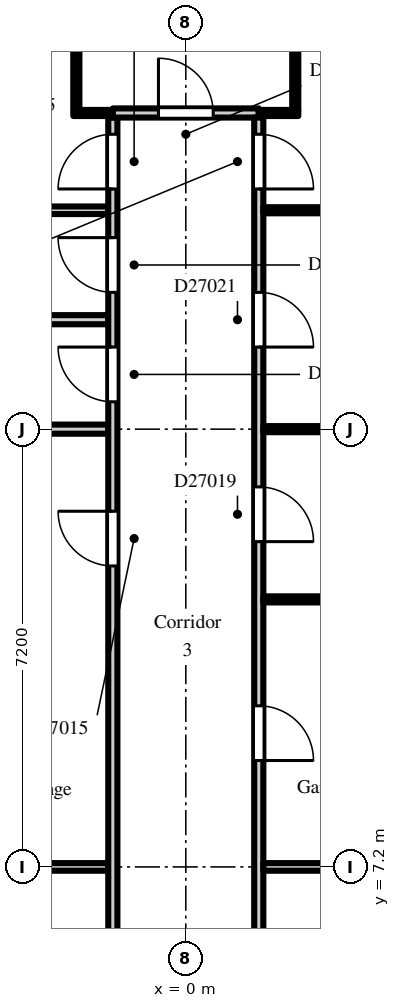
"""IFC4 building model, lengths in metres.
Left out: names, types, materials, properties, quantities, classifications, styles, units other than length and angle.
Written with IfcOpenShell. Run it as: python <this file> out.ifc"""

import sys

from ifc_helpers import new_model, si_unit, direction, frame, frame_2d, origin, place, context, subcontext, project, spatial, rectangle, extrude, element, fill, save


model = new_model("IFC4")
c1 = context("Model", 3, precision=1e-05, world=origin(), true_north=direction((0.0, 1.0)))
c2 = subcontext(c1, "Body", "Model", "MODEL_VIEW")
j1 = project(units=[si_unit("LENGTHUNIT", "METRE"), si_unit("PLANEANGLEUNIT", "RADIAN")], contexts=[c1])
p1 = place(None, origin())
s1 = spatial("IfcSite", under=j1, at=p1, CompositionType="ELEMENT")
p2 = place(p1, origin())
s2 = spatial("IfcBuilding", under=s1, at=p2, CompositionType="ELEMENT")
p3 = place(p2, frame((0.0, 0.0, 188.7)))
s3 = spatial("IfcBuildingStorey", under=s2, at=p3, CompositionType="ELEMENT", Elevation=188.7)
p4 = place(p3, frame((-6.9, 16.2, 0.0), z_axis=(0.0, 0.0, 1.0), x_axis=(1.0, 0.0, 0.0)))
e1 = element("IfcWall", 1, at=p4, inside=s3, PredefinedType="PARTITIONING", context=c2, shape_type="SweptSolid", body=[
    extrude(rectangle(XDim=5.625, YDim=0.15, at=frame_2d((2.812, 0.0))), origin(), (0.0, 0.0, 1.0), 2.6),
])
p5 = place(p3, frame((-5.1, 18.0, 0.0), z_axis=(0.0, 0.0, 1.0), x_axis=(1.0, 0.0, 0.0)))
e2 = element("IfcWall", 2, at=p5, inside=s3, PredefinedType="PARTITIONING", context=c2, shape_type="SweptSolid", body=[
    extrude(rectangle(XDim=3.825, YDim=0.125, at=frame_2d((1.913, 0.0))), origin(), (0.0, 0.0, 1.0), 2.6),
])
p6 = place(p3, frame((-3.9, 7.2, 0.0), z_axis=(0.0, 0.0, 1.0), x_axis=(1.0, 0.0, 0.0)))
e3 = element("IfcWall", 3, at=p6, inside=s3, PredefinedType="PARTITIONING", context=c2, shape_type="SweptSolid", body=[
    extrude(rectangle(XDim=2.625, YDim=0.125, at=frame_2d((1.312, 0.0))), origin(), (0.0, 0.0, 1.0), 2.6),
])
p7 = place(p3, frame((-3.9, 14.4, 0.0), z_axis=(0.0, 0.0, 1.0), x_axis=(1.0, 0.0, 0.0)))
e4 = element("IfcWall", 4, at=p7, inside=s3, PredefinedType="PARTITIONING", context=c2, shape_type="SweptSolid", body=[
    extrude(rectangle(XDim=2.625, YDim=0.15, at=frame_2d((1.312, 0.0))), origin(), (0.0, 0.0, 1.0), 2.6),
])
p8 = place(p3, frame((-1.8, 19.55, 0.0), z_axis=(0.0, 0.0, 1.0), x_axis=(0.0, 1.0, 0.0)))
e5 = element("IfcWall", 5, at=p8, inside=s3, PredefinedType="PARTITIONING", context=c2, shape_type="SweptSolid", body=[
    extrude(rectangle(XDim=1.75, YDim=0.1, at=frame_2d((0.875, 0.0))), origin(), (0.0, 0.0, 1.0), 2.6),
])
p9 = place(p3, frame((-1.75, 19.6, 0.0), z_axis=(0.0, 0.0, 1.0), x_axis=(1.0, 0.0, 0.0)))
e6 = element("IfcWall", 6, at=p9, inside=s3, PredefinedType="PARTITIONING", context=c2, shape_type="SweptSolid", body=[
    extrude(rectangle(XDim=0.55, YDim=0.1, at=frame_2d((0.275, 0.0))), origin(), (0.0, 0.0, 1.0), 2.6),
])
p10 = place(p3, frame((-1.2, 1.275, 0.0), z_axis=(0.0, 0.0, 1.0), x_axis=(0.0, 1.0, 0.0)))
e7 = element("IfcWall", 7, at=p10, inside=s3, PredefinedType="PARTITIONING", context=c2, shape_type="SweptSolid", body=[
    extrude(rectangle(XDim=18.25, YDim=0.15, at=frame_2d((9.125, 0.0))), origin(), (0.0, 0.0, 1.0), 2.6),
])
p11 = place(p10, frame((2.475, 0.0, 0.0)))
e8 = element("IfcOpeningElement", 8, at=p11, cuts=e7, PredefinedType="OPENING", context=c2, shape_type="SweptSolid", body=[
    extrude(rectangle(XDim=0.9, YDim=2.1, at=frame_2d((0.45, 1.05))), frame((0.0, 0.085, 0.0), z_axis=(0.0, -1.0, 0.0), x_axis=(1.0, 0.0, 0.0)), (0.0, 0.0, 1.0), 0.17),
])
p12 = place(p10, frame((10.875, 0.0, 0.0)))
e9 = element("IfcOpeningElement", 9, at=p12, cuts=e7, PredefinedType="OPENING", context=c2, shape_type="SweptSolid", body=[
    extrude(rectangle(XDim=0.9, YDim=2.1, at=frame_2d((0.45, 1.05))), frame((0.0, 0.085, 0.0), z_axis=(0.0, -1.0, 0.0), x_axis=(1.0, 0.0, 0.0)), (0.0, 0.0, 1.0), 0.17),
])
p13 = place(p10, frame((13.575, 0.0, 0.0)))
e10 = element("IfcOpeningElement", 10, at=p13, cuts=e7, PredefinedType="OPENING", context=c2, shape_type="SweptSolid", body=[
    extrude(rectangle(XDim=0.9, YDim=2.1, at=frame_2d((0.45, 1.05))), frame((0.0, 0.085, 0.0), z_axis=(0.0, -1.0, 0.0), x_axis=(1.0, 0.0, 0.0)), (0.0, 0.0, 1.0), 0.17),
])
p14 = place(p10, frame((15.375, 0.0, 0.0)))
e11 = element("IfcOpeningElement", 11, at=p14, cuts=e7, PredefinedType="OPENING", context=c2, shape_type="SweptSolid", body=[
    extrude(rectangle(XDim=0.9, YDim=2.1, at=frame_2d((0.45, 1.05))), frame((0.0, 0.085, 0.0), z_axis=(0.0, -1.0, 0.0), x_axis=(1.0, 0.0, 0.0)), (0.0, 0.0, 1.0), 0.17),
])
p15 = place(p10, frame((17.075, 0.0, 0.0)))
e12 = element("IfcOpeningElement", 12, at=p15, cuts=e7, PredefinedType="OPENING", context=c2, shape_type="SweptSolid", body=[
    extrude(rectangle(XDim=0.9, YDim=2.1, at=frame_2d((0.45, 1.05))), frame((0.0, 0.085, 0.0), z_axis=(0.0, -1.0, 0.0), x_axis=(1.0, 0.0, 0.0)), (0.0, 0.0, 1.0), 0.17),
])
p16 = place(p3, frame((-1.2, 19.6, 0.0), z_axis=(0.0, 0.0, 1.0), x_axis=(1.0, 0.0, 0.0)))
e13 = element("IfcWall", 13, at=p16, inside=s3, PredefinedType="PARTITIONING", context=c2, shape_type="SweptSolid", body=[
    extrude(rectangle(XDim=2.4, YDim=0.15, at=frame_2d((1.2, 0.0))), origin(), (0.0, 0.0, 1.0), 2.6),
])
p17 = place(p16, frame((0.75, 0.0, 0.0)))
e14 = element("IfcOpeningElement", 14, at=p17, cuts=e13, PredefinedType="OPENING", context=c2, shape_type="SweptSolid", body=[
    extrude(rectangle(XDim=0.9, YDim=2.1, at=frame_2d((0.45, 1.05))), frame((0.0, 0.085, 0.0), z_axis=(0.0, -1.0, 0.0), x_axis=(1.0, 0.0, 0.0)), (0.0, 0.0, 1.0), 0.17),
])
p18 = place(p3, frame((1.2, 1.125, 0.0), z_axis=(0.0, 0.0, 1.0), x_axis=(0.0, 1.0, 0.0)))
e15 = element("IfcWall", 15, at=p18, inside=s3, PredefinedType="PARTITIONING", context=c2, shape_type="SweptSolid", body=[
    extrude(rectangle(XDim=18.4, YDim=0.15, at=frame_2d((9.2, 0.0))), origin(), (0.0, 0.0, 1.0), 2.6),
])
p19 = place(p18, frame((3.825, 0.0, 0.0)))
e16 = element("IfcOpeningElement", 16, at=p19, cuts=e15, PredefinedType="OPENING", context=c2, shape_type="SweptSolid", body=[
    extrude(rectangle(XDim=0.9, YDim=2.1, at=frame_2d((0.45, 1.05))), frame((0.0, 0.085, 0.0), z_axis=(0.0, -1.0, 0.0), x_axis=(1.0, 0.0, 0.0)), (0.0, 0.0, 1.0), 0.17),
])
p20 = place(p18, frame((11.425, 0.0, 0.0)))
e17 = element("IfcOpeningElement", 17, at=p20, cuts=e15, PredefinedType="OPENING", context=c2, shape_type="SweptSolid", body=[
    extrude(rectangle(XDim=0.9, YDim=2.1, at=frame_2d((0.45, 1.05))), frame((0.0, 0.085, 0.0), z_axis=(0.0, -1.0, 0.0), x_axis=(1.0, 0.0, 0.0)), (0.0, 0.0, 1.0), 0.17),
])
p21 = place(p18, frame((7.825, 0.0, 0.0)))
e18 = element("IfcOpeningElement", 18, at=p21, cuts=e15, PredefinedType="OPENING", context=c2, shape_type="SweptSolid", body=[
    extrude(rectangle(XDim=0.9, YDim=2.1, at=frame_2d((0.45, 1.05))), frame((0.0, 0.085, 0.0), z_axis=(0.0, -1.0, 0.0), x_axis=(1.0, 0.0, 0.0)), (0.0, 0.0, 1.0), 0.17),
])
p22 = place(p18, frame((14.625, 0.0, 0.0)))
e19 = element("IfcOpeningElement", 19, at=p22, cuts=e15, PredefinedType="OPENING", context=c2, shape_type="SweptSolid", body=[
    extrude(rectangle(XDim=0.9, YDim=2.1, at=frame_2d((0.45, 1.05))), frame((0.0, 0.085, 0.0), z_axis=(0.0, -1.0, 0.0), x_axis=(1.0, 0.0, 0.0)), (0.0, 0.0, 1.0), 0.17),
])
p23 = place(p18, frame((17.225, 0.0, 0.0)))
e20 = element("IfcOpeningElement", 20, at=p23, cuts=e15, PredefinedType="OPENING", context=c2, shape_type="SweptSolid", body=[
    extrude(rectangle(XDim=0.9, YDim=2.1, at=frame_2d((0.45, 1.05))), frame((0.0, 0.085, 0.0), z_axis=(0.0, -1.0, 0.0), x_axis=(1.0, 0.0, 0.0)), (0.0, 0.0, 1.0), 0.17),
])
p24 = place(p3, frame((1.275, 7.2, 0.0), z_axis=(0.0, 0.0, 1.0), x_axis=(1.0, 0.0, 0.0)))
e21 = element("IfcWall", 21, at=p24, inside=s3, PredefinedType="PARTITIONING", context=c2, shape_type="SweptSolid", body=[
    extrude(rectangle(XDim=2.625, YDim=0.125, at=frame_2d((1.312, 0.0))), origin(), (0.0, 0.0, 1.0), 2.6),
])
for number, where, z_axis, x_axis in (
    (22, (1.275, 11.6, 0.0), (0.0, 0.0, 1.0), (1.0, 0.0, 0.0)),
    (23, (1.275, 14.4, 0.0), (0.0, 0.0, 1.0), (1.0, 0.0, 0.0)),
):
    element("IfcWall", number, at=place(p3, frame(where, z_axis=z_axis, x_axis=x_axis)), inside=s3, PredefinedType="PARTITIONING", context=c2, shape_type="SweptSolid", body=[
        extrude(rectangle(XDim=2.625, YDim=0.1, at=frame_2d((1.312, 0.0))), origin(), (0.0, 0.0, 1.0), 2.6),
    ])
p25 = place(p3, frame((1.275, 18.0, 0.0), z_axis=(0.0, 0.0, 1.0), x_axis=(1.0, 0.0, 0.0)))
e24 = element("IfcWall", 24, at=p25, inside=s3, PredefinedType="PARTITIONING", context=c2, shape_type="SweptSolid", body=[
    extrude(rectangle(XDim=3.825, YDim=0.1, at=frame_2d((1.913, 0.0))), origin(), (0.0, 0.0, 1.0), 2.6),
])
p26 = place(p3, frame((1.2, 19.6, 0.0), z_axis=(0.0, 0.0, 1.0), x_axis=(1.0, 0.0, 0.0)))
e25 = element("IfcWall", 25, at=p26, inside=s3, PredefinedType="PARTITIONING", context=c2, shape_type="SweptSolid", body=[
    extrude(rectangle(XDim=0.65, YDim=0.1, at=frame_2d((0.325, 0.0))), origin(), (0.0, 0.0, 1.0), 2.6),
])
p27 = place(p3, frame((1.8, 19.65, 0.0), z_axis=(0.0, 0.0, 1.0), x_axis=(0.0, 1.0, 0.0)))
e26 = element("IfcWall", 26, at=p27, inside=s3, PredefinedType="PARTITIONING", context=c2, shape_type="SweptSolid", body=[
    extrude(rectangle(XDim=1.65, YDim=0.1, at=frame_2d((0.825, 0.0))), origin(), (0.0, 0.0, 1.0), 2.6),
])
p28 = place(p17, origin())
e27 = element("IfcDoor", 27, at=p28, inside=s3, OperationType="SINGLE_SWING_LEFT", PredefinedType="DOOR", context=c2, shape_type="SweptSolid", body=[
    extrude(rectangle(XDim=0.9, YDim=2.1, at=frame_2d((0.45, 1.05))), frame((0.0, 0.025, 0.0), z_axis=(0.0, -1.0, 0.0), x_axis=(1.0, 0.0, 0.0)), (0.0, 0.0, 1.0), 0.05),
])
fill(e14, e27)
p29 = place(p12, origin())
e28 = element("IfcDoor", 28, at=p29, inside=s3, OperationType="SINGLE_SWING_RIGHT", PredefinedType="DOOR", context=c2, shape_type="SweptSolid", body=[
    extrude(rectangle(XDim=0.9, YDim=2.1, at=frame_2d((0.45, 1.05))), frame((0.0, 0.025, 0.0), z_axis=(0.0, -1.0, 0.0), x_axis=(1.0, 0.0, 0.0)), (0.0, 0.0, 1.0), 0.05),
])
fill(e9, e28)
p30 = place(p13, origin())
e29 = element("IfcDoor", 29, at=p30, inside=s3, OperationType="SINGLE_SWING_RIGHT", PredefinedType="DOOR", context=c2, shape_type="SweptSolid", body=[
    extrude(rectangle(XDim=0.9, YDim=2.1, at=frame_2d((0.45, 1.05))), frame((0.0, 0.025, 0.0), z_axis=(0.0, -1.0, 0.0), x_axis=(1.0, 0.0, 0.0)), (0.0, 0.0, 1.0), 0.05),
])
fill(e10, e29)
p31 = place(p14, origin())
e30 = element("IfcDoor", 30, at=p31, inside=s3, OperationType="SINGLE_SWING_RIGHT", PredefinedType="DOOR", context=c2, shape_type="SweptSolid", body=[
    extrude(rectangle(XDim=0.9, YDim=2.1, at=frame_2d((0.45, 1.05))), frame((0.0, 0.025, 0.0), z_axis=(0.0, -1.0, 0.0), x_axis=(1.0, 0.0, 0.0)), (0.0, 0.0, 1.0), 0.05),
])
fill(e11, e30)
p32 = place(p15, origin())
e31 = element("IfcDoor", 31, at=p32, inside=s3, OperationType="SINGLE_SWING_LEFT", PredefinedType="DOOR", context=c2, shape_type="SweptSolid", body=[
    extrude(rectangle(XDim=0.9, YDim=2.1, at=frame_2d((0.45, 1.05))), frame((0.0, 0.025, 0.0), z_axis=(0.0, -1.0, 0.0), x_axis=(1.0, 0.0, 0.0)), (0.0, 0.0, 1.0), 0.05),
])
fill(e12, e31)
p33 = place(p20, frame((0.9, 0.0, 0.0), z_axis=(0.0, 0.0, 1.0), x_axis=(-1.0, 0.0, 0.0)))
e32 = element("IfcDoor", 32, at=p33, inside=s3, OperationType="SINGLE_SWING_RIGHT", PredefinedType="DOOR", context=c2, shape_type="SweptSolid", body=[
    extrude(rectangle(XDim=0.9, YDim=2.1, at=frame_2d((0.45, 1.05))), frame((0.0, 0.025, 0.0), z_axis=(0.0, -1.0, 0.0), x_axis=(1.0, 0.0, 0.0)), (0.0, 0.0, 1.0), 0.05),
])
fill(e17, e32)
p34 = place(p21, frame((0.9, 0.0, 0.0), z_axis=(0.0, 0.0, 1.0), x_axis=(-1.0, 0.0, 0.0)))
e33 = element("IfcDoor", 33, at=p34, inside=s3, OperationType="SINGLE_SWING_RIGHT", PredefinedType="DOOR", context=c2, shape_type="SweptSolid", body=[
    extrude(rectangle(XDim=0.9, YDim=2.1, at=frame_2d((0.45, 1.05))), frame((0.0, 0.025, 0.0), z_axis=(0.0, -1.0, 0.0), x_axis=(1.0, 0.0, 0.0)), (0.0, 0.0, 1.0), 0.05),
])
fill(e18, e33)
p35 = place(p22, frame((0.9, 0.0, 0.0), z_axis=(0.0, 0.0, 1.0), x_axis=(-1.0, 0.0, 0.0)))
e34 = element("IfcDoor", 34, at=p35, inside=s3, OperationType="SINGLE_SWING_RIGHT", PredefinedType="DOOR", context=c2, shape_type="SweptSolid", body=[
    extrude(rectangle(XDim=0.9, YDim=2.1, at=frame_2d((0.45, 1.05))), frame((0.0, 0.025, 0.0), z_axis=(0.0, -1.0, 0.0), x_axis=(1.0, 0.0, 0.0)), (0.0, 0.0, 1.0), 0.05),
])
fill(e19, e34)
p36 = place(p23, frame((0.9, 0.0, 0.0), z_axis=(0.0, 0.0, 1.0), x_axis=(-1.0, 0.0, 0.0)))
e35 = element("IfcDoor", 35, at=p36, inside=s3, OperationType="SINGLE_SWING_RIGHT", PredefinedType="DOOR", context=c2, shape_type="SweptSolid", body=[
    extrude(rectangle(XDim=0.9, YDim=2.1, at=frame_2d((0.45, 1.05))), frame((0.0, 0.025, 0.0), z_axis=(0.0, -1.0, 0.0), x_axis=(1.0, 0.0, 0.0)), (0.0, 0.0, 1.0), 0.05),
])
fill(e20, e35)
save(model, sys.argv[1])
